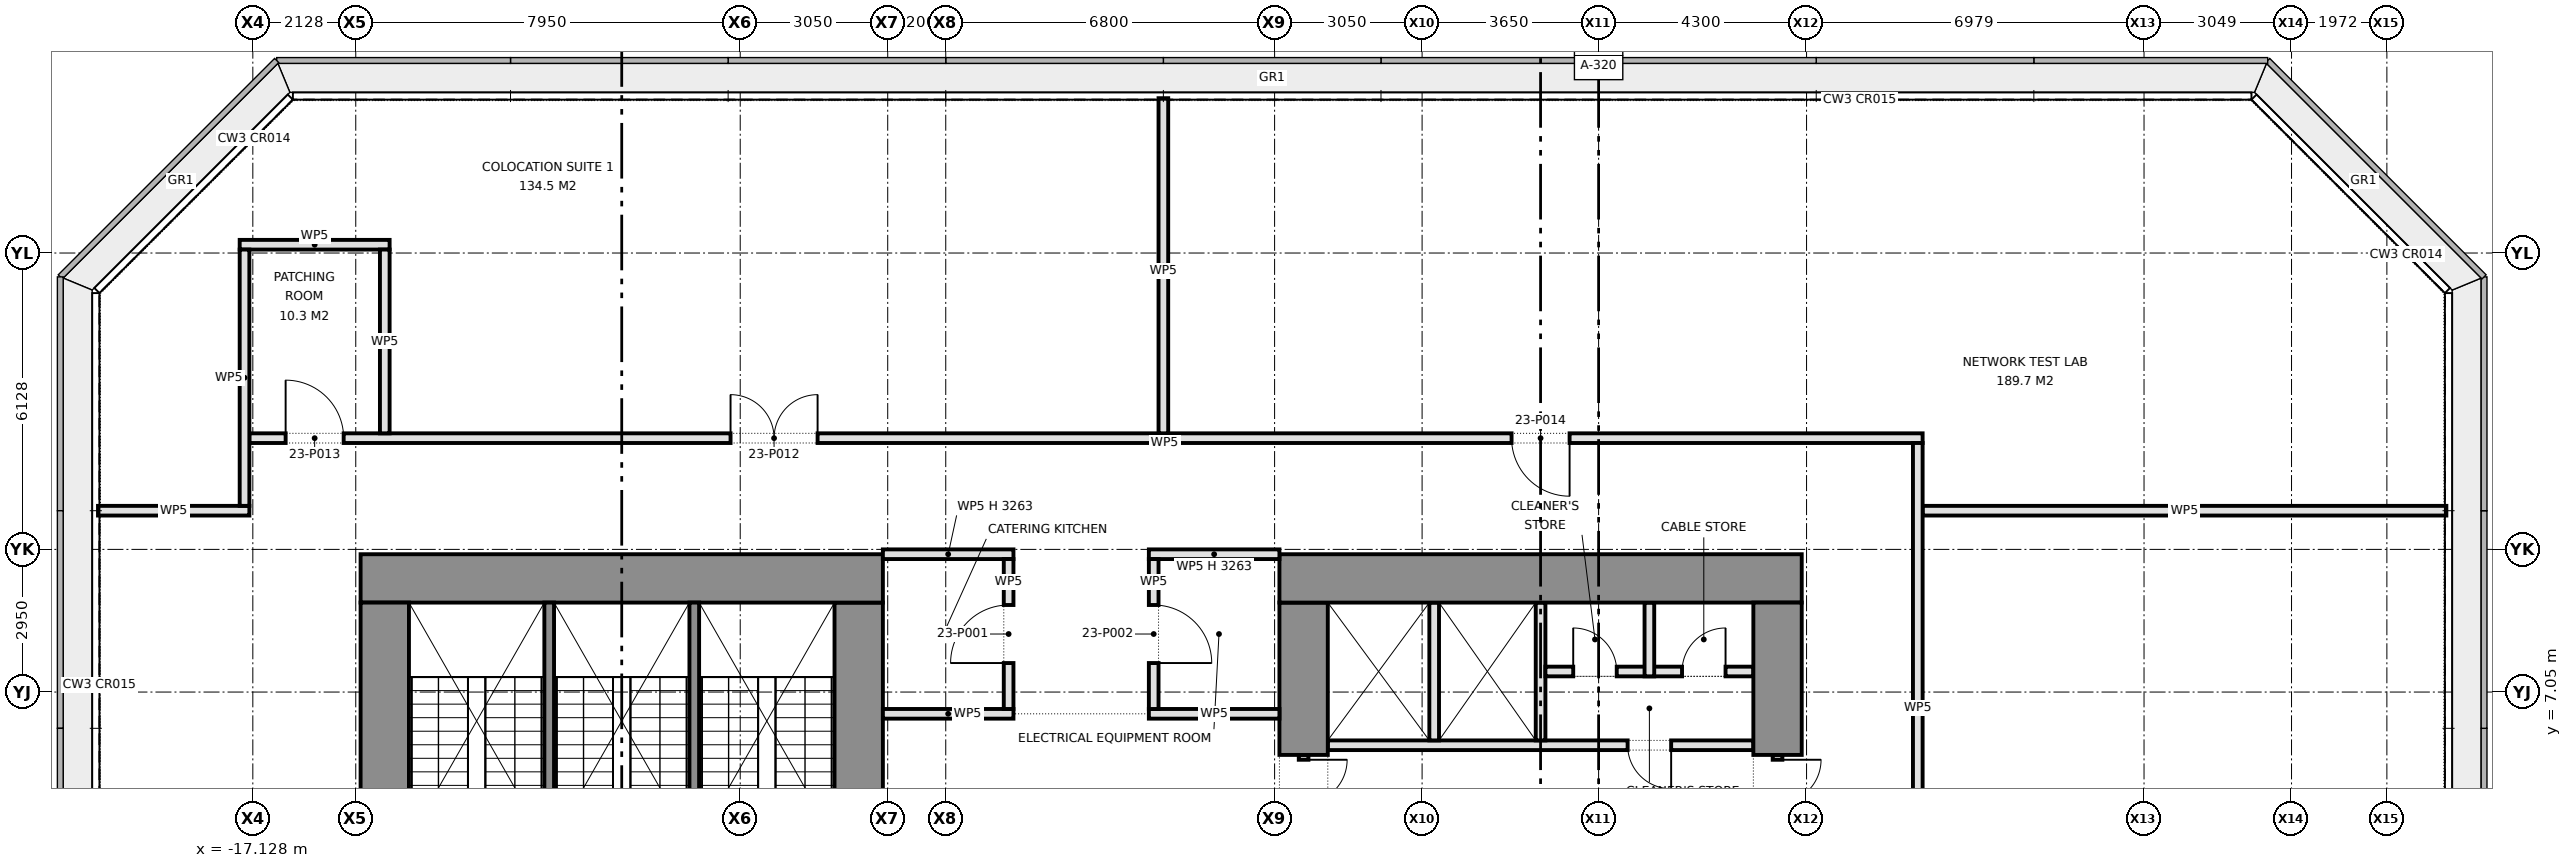
"""IFC4 building model, lengths in metres.
Left out: names, types, materials, properties, quantities, classifications, styles, units other than length and angle.
Written with IfcOpenShell. Run it as: python <this file> out.ifc"""

import sys

from ifc_helpers import new_model, si_unit, direction, frame, frame_2d, origin, place, context, subcontext, project, spatial, rectangle, extrude, element, fill, save


model = new_model("IFC4")
c1 = context("Model", 3, precision=1e-05, world=origin(), true_north=direction((0.0, 1.0)))
c2 = subcontext(c1, "Body", "Model", "MODEL_VIEW")
j1 = project(units=[si_unit("LENGTHUNIT", "METRE"), si_unit("PLANEANGLEUNIT", "RADIAN")], contexts=[c1])
p1 = place(None, origin())
s1 = spatial("IfcSite", under=j1, at=p1, CompositionType="ELEMENT")
p2 = place(p1, origin())
s2 = spatial("IfcBuilding", under=s1, at=p2, CompositionType="ELEMENT")
p3 = place(p2, frame((0.0, 0.0, 104.0)))
s3 = spatial("IfcBuildingStorey", under=s2, at=p3, CompositionType="ELEMENT", Elevation=104.0)
p4 = place(p3, frame((-14.9, 9.4, 0.0), z_axis=(0.0, 0.0, 1.0), x_axis=(1.0, 0.0, 0.0)))
e1 = element("IfcWall", 1, at=p4, inside=s3, PredefinedType="SHEAR", context=c2, shape_type="SweptSolid", body=[
    extrude(rectangle(XDim=10.8, YDim=1.0, at=frame_2d((5.4, 0.0))), origin(), (0.0, 0.0, 1.0), 4.2),
])
p5 = place(p3, frame((-14.4, 3.68, 0.0), z_axis=(0.0, 0.0, 1.0), x_axis=(0.0, 1.0, 0.0)))
e2 = element("IfcWall", 2, at=p5, inside=s3, PredefinedType="SHEAR", context=c2, shape_type="SweptSolid", body=[
    extrude(rectangle(XDim=5.22, YDim=1.0, at=frame_2d((2.61, 0.0))), origin(), (0.0, 0.0, 1.0), 4.2),
])
p6 = place(p3, frame((-4.6, 1.55, 0.0), z_axis=(0.0, 0.0, 1.0), x_axis=(0.0, 1.0, 0.0)))
e3 = element("IfcWall", 3, at=p6, inside=s3, PredefinedType="SHEAR", context=c2, shape_type="SweptSolid", body=[
    extrude(rectangle(XDim=7.35, YDim=1.0, at=frame_2d((3.675, 0.0))), origin(), (0.0, 0.0, 1.0), 4.2),
])
for number, where, z_axis, x_axis in (
    (4, (-11.0, 2.38, 0.0), (0.0, 0.0, 1.0), (0.0, 1.0, 0.0)),
    (5, (-8.0, 2.38, 0.0), (0.0, 0.0, 1.0), (0.0, 1.0, 0.0)),
):
    element("IfcWall", number, at=place(p3, frame(where, z_axis=z_axis, x_axis=x_axis)), inside=s3, PredefinedType="SHEAR", context=c2, shape_type="SweptSolid", body=[
        extrude(rectangle(XDim=6.52, YDim=0.2, at=frame_2d((3.26, 0.0))), origin(), (0.0, 0.0, 1.0), 4.2),
    ])
p7 = place(p3, frame((14.9, 9.4, 0.0), z_axis=(0.0, 0.0, 1.0), x_axis=(-1.0, 0.0, 0.0)))
e6 = element("IfcWall", 6, at=p7, inside=s3, PredefinedType="SHEAR", context=c2, shape_type="SweptSolid", body=[
    extrude(rectangle(XDim=10.8, YDim=1.0, at=frame_2d((5.4, 0.0))), origin(), (0.0, 0.0, 1.0), 4.2),
])
p8 = place(p3, frame((14.4, 8.9, 0.0), z_axis=(0.0, 0.0, 1.0), x_axis=(0.0, -1.0, 0.0)))
e7 = element("IfcWall", 7, at=p8, inside=s3, PredefinedType="SHEAR", context=c2, shape_type="SweptSolid", body=[
    extrude(rectangle(XDim=3.15, YDim=1.0, at=frame_2d((1.575, 0.0))), origin(), (0.0, 0.0, 1.0), 4.2),
])
p9 = place(p3, frame((14.4, 5.75, 0.0), z_axis=(0.0, 0.0, 1.0), x_axis=(0.0, -1.0, 0.0)))
e8 = element("IfcWall", 8, at=p9, inside=s3, PredefinedType="PARTITIONING", context=c2, shape_type="SweptSolid", body=[
    extrude(rectangle(XDim=2.0, YDim=0.2, at=frame_2d((1.0, 0.0))), origin(), (0.0, 0.0, 1.0), 2.4),
])
p10 = place(p9, frame((0.1, 0.0, 0.0)))
e9 = element("IfcOpeningElement", 9, at=p10, cuts=e8, PredefinedType="OPENING", context=c2, shape_type="SweptSolid", body=[
    extrude(rectangle(XDim=1.8, YDim=2.1, at=frame_2d((0.9, 1.05))), frame((0.0, 0.11, 0.0), z_axis=(0.0, -1.0, 0.0), x_axis=(1.0, 0.0, 0.0)), (0.0, 0.0, 1.0), 0.22),
])
p11 = place(p3, frame((4.6, 8.9, 0.0), z_axis=(0.0, 0.0, 1.0), x_axis=(0.0, -1.0, 0.0)))
e10 = element("IfcWall", 10, at=p11, inside=s3, PredefinedType="SHEAR", context=c2, shape_type="SweptSolid", body=[
    extrude(rectangle(XDim=3.15, YDim=1.0, at=frame_2d((1.575, 0.0))), origin(), (0.0, 0.0, 1.0), 4.2),
])
p12 = place(p3, frame((4.6, 5.75, 0.0), z_axis=(0.0, 0.0, 1.0), x_axis=(0.0, -1.0, 0.0)))
e11 = element("IfcWall", 11, at=p12, inside=s3, PredefinedType="PARTITIONING", context=c2, shape_type="SweptSolid", body=[
    extrude(rectangle(XDim=2.0, YDim=0.2, at=frame_2d((1.0, 0.0))), origin(), (0.0, 0.0, 1.0), 2.4),
])
p13 = place(p12, frame((0.1, 0.0, 0.0)))
e12 = element("IfcOpeningElement", 12, at=p13, cuts=e11, PredefinedType="OPENING", context=c2, shape_type="SweptSolid", body=[
    extrude(rectangle(XDim=1.8, YDim=2.1, at=frame_2d((0.9, 1.05))), frame((0.0, 0.11, 0.0), z_axis=(0.0, -1.0, 0.0), x_axis=(1.0, 0.0, 0.0)), (0.0, 0.0, 1.0), 0.22),
])
p14 = place(p3, frame((13.9, 5.95, 0.0), z_axis=(0.0, 0.0, 1.0), x_axis=(-1.0, 0.0, 0.0)))
e13 = element("IfcWall", 13, at=p14, inside=s3, PredefinedType="PARTITIONING", context=c2, shape_type="SweptSolid", body=[
    extrude(rectangle(XDim=8.8, YDim=0.2, at=frame_2d((4.4, 0.0))), origin(), (0.0, 0.0, 1.0), 4.2),
])
p15 = place(p14, frame((1.7, 0.0, 0.0)))
e14 = element("IfcOpeningElement", 14, at=p15, cuts=e13, PredefinedType="OPENING", context=c2, shape_type="SweptSolid", body=[
    extrude(rectangle(XDim=0.9, YDim=2.1, at=frame_2d((0.45, 1.05))), frame((0.0, 0.11, 0.0), z_axis=(0.0, -1.0, 0.0), x_axis=(1.0, 0.0, 0.0)), (0.0, 0.0, 1.0), 0.22),
])
for number, where, z_axis, x_axis in (
    (15, (9.5, 8.9, 0.0), (0.0, 0.0, 1.0), (0.0, -1.0, 0.0)),
    (16, (7.3, 8.9, 0.0), (0.0, 0.0, 1.0), (0.0, -1.0, 0.0)),
):
    element("IfcWall", number, at=place(p3, frame(where, z_axis=z_axis, x_axis=x_axis)), inside=s3, PredefinedType="PARTITIONING", context=c2, shape_type="SweptSolid", body=[
        extrude(rectangle(XDim=2.85, YDim=0.2, at=frame_2d((1.425, 0.0))), origin(), (0.0, 0.0, 1.0), 4.2),
    ])
p16 = place(p3, frame((13.9, 7.475, 0.0), z_axis=(0.0, 0.0, 1.0), x_axis=(-1.0, 0.0, 0.0)))
e17 = element("IfcWall", 17, at=p16, inside=s3, PredefinedType="PARTITIONING", context=c2, shape_type="SweptSolid", body=[
    extrude(rectangle(XDim=4.3, YDim=0.2, at=frame_2d((2.15, 0.0))), origin(), (0.0, 0.0, 1.0), 4.2),
])
p17 = place(p16, frame((0.575, 0.0, 0.0)))
e18 = element("IfcOpeningElement", 18, at=p17, cuts=e17, PredefinedType="OPENING", context=c2, shape_type="SweptSolid", body=[
    extrude(rectangle(XDim=0.9, YDim=2.1, at=frame_2d((0.45, 1.05))), frame((0.0, 0.11, 0.0), z_axis=(0.0, -1.0, 0.0), x_axis=(1.0, 0.0, 0.0)), (0.0, 0.0, 1.0), 0.22),
])
p18 = place(p16, frame((2.825, 0.0, 0.0)))
e19 = element("IfcOpeningElement", 19, at=p18, cuts=e17, PredefinedType="OPENING", context=c2, shape_type="SweptSolid", body=[
    extrude(rectangle(XDim=0.9, YDim=2.1, at=frame_2d((0.45, 1.05))), frame((0.0, 0.11, 0.0), z_axis=(0.0, -1.0, 0.0), x_axis=(1.0, 0.0, 0.0)), (0.0, 0.0, 1.0), 0.22),
])
p19 = place(p3, frame((11.75, 8.9, 0.0), z_axis=(0.0, 0.0, 1.0), x_axis=(0.0, -1.0, 0.0)))
e20 = element("IfcWall", 20, at=p19, inside=s3, PredefinedType="PARTITIONING", context=c2, shape_type="SweptSolid", body=[
    extrude(rectangle(XDim=1.525, YDim=0.2, at=frame_2d((0.762, 0.0))), origin(), (0.0, 0.0, 1.0), 4.2),
])
for number, where, z_axis, x_axis in (
    (21, (-4.1, 6.6, 0.0), (0.0, 0.0, 1.0), (1.0, 0.0, 0.0)),
    (22, (1.4, 6.6, 0.0), (0.0, 0.0, 1.0), (1.0, 0.0, 0.0)),
):
    element("IfcWall", number, at=place(p3, frame(where, z_axis=z_axis, x_axis=x_axis)), inside=s3, PredefinedType="PARTITIONING", context=c2, shape_type="SweptSolid", body=[
        extrude(rectangle(XDim=2.7, YDim=0.2, at=frame_2d((1.35, 0.0))), origin(), (0.0, 0.0, 1.0), 4.2),
    ])
for number, where, z_axis, x_axis in (
    (23, (-4.1, 9.9, 0.0), (0.0, 0.0, 1.0), (1.0, 0.0, 0.0)),
    (24, (1.4, 9.9, 0.0), (0.0, 0.0, 1.0), (1.0, 0.0, 0.0)),
):
    element("IfcWall", number, at=place(p3, frame(where, z_axis=z_axis, x_axis=x_axis)), inside=s3, PredefinedType="PARTITIONING", context=c2, shape_type="SweptSolid", body=[
        extrude(rectangle(XDim=2.7, YDim=0.2, at=frame_2d((1.35, 0.0))), origin(), (0.0, 0.0, 1.0), 3.263),
    ])
p20 = place(p3, frame((-20.33, 10.8, 0.0), z_axis=(0.0, 0.0, 1.0), x_axis=(1.0, 0.0, 0.0)))
e25 = element("IfcWall", 25, at=p20, inside=s3, PredefinedType="PARTITIONING", context=c2, shape_type="SweptSolid", body=[
    extrude(rectangle(XDim=3.13, YDim=0.2, at=frame_2d((1.565, 0.0))), origin(), (0.0, 0.0, 1.0), 4.2),
])
p21 = place(p3, frame((17.4, 10.8, 0.0), z_axis=(0.0, 0.0, 1.0), x_axis=(1.0, 0.0, 0.0)))
e26 = element("IfcWall", 26, at=p21, inside=s3, PredefinedType="PARTITIONING", context=c2, shape_type="SweptSolid", body=[
    extrude(rectangle(XDim=10.83, YDim=0.2, at=frame_2d((5.415, 0.0))), origin(), (0.0, 0.0, 1.0), 4.2),
])
p22 = place(p3, frame((-17.2, 12.3, 0.0), z_axis=(0.0, 0.0, 1.0), x_axis=(1.0, 0.0, 0.0)))
e27 = element("IfcWall", 27, at=p22, inside=s3, PredefinedType="PARTITIONING", context=c2, shape_type="SweptSolid", body=[
    extrude(rectangle(XDim=34.6, YDim=0.2, at=frame_2d((17.3, 0.0))), origin(), (0.0, 0.0, 1.0), 4.2),
])
p23 = place(p22, frame((9.95, 0.0, 0.0)))
e28 = element("IfcOpeningElement", 28, at=p23, cuts=e27, PredefinedType="OPENING", context=c2, shape_type="SweptSolid", body=[
    extrude(rectangle(XDim=1.8, YDim=2.1, at=frame_2d((0.9, 1.05))), frame((0.0, 0.11, 0.0), z_axis=(0.0, -1.0, 0.0), x_axis=(1.0, 0.0, 0.0)), (0.0, 0.0, 1.0), 0.22),
])
p24 = place(p22, frame((0.75, 0.0, 0.0)))
e29 = element("IfcOpeningElement", 29, at=p24, cuts=e27, PredefinedType="OPENING", context=c2, shape_type="SweptSolid", body=[
    extrude(rectangle(XDim=1.2, YDim=2.1, at=frame_2d((0.6, 1.05))), frame((0.0, 0.11, 0.0), z_axis=(0.0, -1.0, 0.0), x_axis=(1.0, 0.0, 0.0)), (0.0, 0.0, 1.0), 0.22),
])
p25 = place(p22, frame((26.1, 0.0, 0.0)))
e30 = element("IfcOpeningElement", 30, at=p25, cuts=e27, PredefinedType="OPENING", context=c2, shape_type="SweptSolid", body=[
    extrude(rectangle(XDim=1.2, YDim=2.1, at=frame_2d((0.6, 1.05))), frame((0.0, 0.11, 0.0), z_axis=(0.0, -1.0, 0.0), x_axis=(1.0, 0.0, 0.0)), (0.0, 0.0, 1.0), 0.22),
])
p26 = place(p3, frame((-17.4, 16.3, 0.0), z_axis=(0.0, 0.0, 1.0), x_axis=(1.0, 0.0, 0.0)))
e31 = element("IfcWall", 31, at=p26, inside=s3, PredefinedType="PARTITIONING", context=c2, shape_type="SweptSolid", body=[
    extrude(rectangle(XDim=3.1, YDim=0.2, at=frame_2d((1.55, 0.0))), origin(), (0.0, 0.0, 1.0), 4.2),
])
p27 = place(p3, frame((17.3, -12.2, 0.0), z_axis=(0.0, 0.0, 1.0), x_axis=(0.0, 1.0, 0.0)))
e32 = element("IfcWall", 32, at=p27, inside=s3, PredefinedType="PARTITIONING", context=c2, shape_type="SweptSolid", body=[
    extrude(rectangle(XDim=24.4, YDim=0.2, at=frame_2d((12.2, 0.0))), origin(), (0.0, 0.0, 1.0), 4.2),
])
p28 = place(p27, frame((11.85, 0.0, 0.0)))
e33 = element("IfcOpeningElement", 33, at=p28, cuts=e32, PredefinedType="OPENING", context=c2, shape_type="SweptSolid", body=[
    extrude(rectangle(XDim=1.8, YDim=2.1, at=frame_2d((0.9, 1.05))), frame((0.0, 0.11, 0.0), z_axis=(0.0, -1.0, 0.0), x_axis=(1.0, 0.0, 0.0)), (0.0, 0.0, 1.0), 0.22),
])
p29 = place(p27, frame((0.7, 0.0, 0.0)))
e34 = element("IfcOpeningElement", 34, at=p29, cuts=e32, PredefinedType="OPENING", context=c2, shape_type="SweptSolid", body=[
    extrude(rectangle(XDim=1.0, YDim=2.1, at=frame_2d((0.5, 1.05))), frame((0.0, 0.11, 0.0), z_axis=(0.0, -1.0, 0.0), x_axis=(1.0, 0.0, 0.0)), (0.0, 0.0, 1.0), 0.22),
])
p30 = place(p3, frame((1.7, 12.4, 0.0), z_axis=(0.0, 0.0, 1.0), x_axis=(0.0, 1.0, 0.0)))
e35 = element("IfcWall", 35, at=p30, inside=s3, PredefinedType="PARTITIONING", context=c2, shape_type="SweptSolid", body=[
    extrude(rectangle(XDim=6.93, YDim=0.2, at=frame_2d((3.465, 0.0))), origin(), (0.0, 0.0, 1.0), 4.2),
])
p31 = place(p3, frame((1.5, 6.7, 0.0), z_axis=(0.0, 0.0, 1.0), x_axis=(0.0, 1.0, 0.0)))
e36 = element("IfcWall", 36, at=p31, inside=s3, PredefinedType="PARTITIONING", context=c2, shape_type="SweptSolid", body=[
    extrude(rectangle(XDim=3.1, YDim=0.2, at=frame_2d((1.55, 0.0))), origin(), (0.0, 0.0, 1.0), 4.2),
])
p32 = place(p31, frame((0.95, 0.0, 0.0)))
e37 = element("IfcOpeningElement", 37, at=p32, cuts=e36, PredefinedType="OPENING", context=c2, shape_type="SweptSolid", body=[
    extrude(rectangle(XDim=1.2, YDim=2.1, at=frame_2d((0.6, 1.05))), frame((0.0, 0.11, 0.0), z_axis=(0.0, -1.0, 0.0), x_axis=(1.0, 0.0, 0.0)), (0.0, 0.0, 1.0), 0.22),
])
p33 = place(p3, frame((-1.5, 6.7, 0.0), z_axis=(0.0, 0.0, 1.0), x_axis=(0.0, 1.0, 0.0)))
e38 = element("IfcWall", 38, at=p33, inside=s3, PredefinedType="PARTITIONING", context=c2, shape_type="SweptSolid", body=[
    extrude(rectangle(XDim=3.1, YDim=0.2, at=frame_2d((1.55, 0.0))), origin(), (0.0, 0.0, 1.0), 4.2),
])
p34 = place(p33, frame((0.95, 0.0, 0.0)))
e39 = element("IfcOpeningElement", 39, at=p34, cuts=e38, PredefinedType="OPENING", context=c2, shape_type="SweptSolid", body=[
    extrude(rectangle(XDim=1.2, YDim=2.1, at=frame_2d((0.6, 1.05))), frame((0.0, 0.11, 0.0), z_axis=(0.0, -1.0, 0.0), x_axis=(1.0, 0.0, 0.0)), (0.0, 0.0, 1.0), 0.22),
])
p35 = place(p3, frame((-14.4, 12.4, 0.0), z_axis=(0.0, 0.0, 1.0), x_axis=(0.0, 1.0, 0.0)))
e40 = element("IfcWall", 40, at=p35, inside=s3, PredefinedType="PARTITIONING", context=c2, shape_type="SweptSolid", body=[
    extrude(rectangle(XDim=3.8, YDim=0.2, at=frame_2d((1.9, 0.0))), origin(), (0.0, 0.0, 1.0), 4.2),
])
p36 = place(p3, frame((-17.3, 10.9, 0.0), z_axis=(0.0, 0.0, 1.0), x_axis=(0.0, 1.0, 0.0)))
e41 = element("IfcWall", 41, at=p36, inside=s3, PredefinedType="PARTITIONING", context=c2, shape_type="SweptSolid", body=[
    extrude(rectangle(XDim=5.3, YDim=0.2, at=frame_2d((2.65, 0.0))), origin(), (0.0, 0.0, 1.0), 4.2),
])
p37 = place(p10, origin())
e42 = element("IfcDoor", 42, at=p37, inside=s3, OperationType="DOUBLE_DOOR_SINGLE_SWING", PredefinedType="DOOR", context=c2, shape_type="SweptSolid", body=[
    extrude(rectangle(XDim=1.8, YDim=2.1, at=frame_2d((0.9, 1.05))), frame((0.0, 0.025, 0.0), z_axis=(0.0, -1.0, 0.0), x_axis=(1.0, 0.0, 0.0)), (0.0, 0.0, 1.0), 0.05),
])
fill(e9, e42)
p38 = place(p13, origin())
e43 = element("IfcDoor", 43, at=p38, inside=s3, OperationType="DOUBLE_DOOR_SINGLE_SWING", PredefinedType="DOOR", context=c2, shape_type="SweptSolid", body=[
    extrude(rectangle(XDim=1.8, YDim=2.1, at=frame_2d((0.9, 1.05))), frame((0.0, 0.025, 0.0), z_axis=(0.0, -1.0, 0.0), x_axis=(1.0, 0.0, 0.0)), (0.0, 0.0, 1.0), 0.05),
])
fill(e12, e43)
p39 = place(p15, origin())
e44 = element("IfcDoor", 44, at=p39, inside=s3, OperationType="SINGLE_SWING_LEFT", PredefinedType="DOOR", context=c2, shape_type="SweptSolid", body=[
    extrude(rectangle(XDim=0.9, YDim=2.1, at=frame_2d((0.45, 1.05))), frame((0.0, 0.025, 0.0), z_axis=(0.0, -1.0, 0.0), x_axis=(1.0, 0.0, 0.0)), (0.0, 0.0, 1.0), 0.05),
])
fill(e14, e44)
p40 = place(p17, frame((0.9, 0.0, 0.0), z_axis=(0.0, 0.0, 1.0), x_axis=(-1.0, 0.0, 0.0)))
e45 = element("IfcDoor", 45, at=p40, inside=s3, OperationType="SINGLE_SWING_RIGHT", PredefinedType="DOOR", context=c2, shape_type="SweptSolid", body=[
    extrude(rectangle(XDim=0.9, YDim=2.1, at=frame_2d((0.45, 1.05))), frame((0.0, 0.025, 0.0), z_axis=(0.0, -1.0, 0.0), x_axis=(1.0, 0.0, 0.0)), (0.0, 0.0, 1.0), 0.05),
])
fill(e18, e45)
p41 = place(p18, frame((0.9, 0.0, 0.0), z_axis=(0.0, 0.0, 1.0), x_axis=(-1.0, 0.0, 0.0)))
e46 = element("IfcDoor", 46, at=p41, inside=s3, OperationType="SINGLE_SWING_LEFT", PredefinedType="DOOR", context=c2, shape_type="SweptSolid", body=[
    extrude(rectangle(XDim=0.9, YDim=2.1, at=frame_2d((0.45, 1.05))), frame((0.0, 0.025, 0.0), z_axis=(0.0, -1.0, 0.0), x_axis=(1.0, 0.0, 0.0)), (0.0, 0.0, 1.0), 0.05),
])
fill(e19, e46)
p42 = place(p34, origin())
e47 = element("IfcDoor", 47, at=p42, inside=s3, OperationType="SINGLE_SWING_LEFT", PredefinedType="DOOR", context=c2, shape_type="SweptSolid", body=[
    extrude(rectangle(XDim=1.2, YDim=2.1, at=frame_2d((0.6, 1.05))), frame((0.0, 0.025, 0.0), z_axis=(0.0, -1.0, 0.0), x_axis=(1.0, 0.0, 0.0)), (0.0, 0.0, 1.0), 0.05),
])
fill(e39, e47)
p43 = place(p32, frame((1.2, 0.0, 0.0), z_axis=(0.0, 0.0, 1.0), x_axis=(-1.0, 0.0, 0.0)))
e48 = element("IfcDoor", 48, at=p43, inside=s3, OperationType="SINGLE_SWING_RIGHT", PredefinedType="DOOR", context=c2, shape_type="SweptSolid", body=[
    extrude(rectangle(XDim=1.2, YDim=2.1, at=frame_2d((0.6, 1.05))), frame((0.0, 0.025, 0.0), z_axis=(0.0, -1.0, 0.0), x_axis=(1.0, 0.0, 0.0)), (0.0, 0.0, 1.0), 0.05),
])
fill(e37, e48)
p44 = place(p23, origin())
e49 = element("IfcDoor", 49, at=p44, inside=s3, OperationType="DOUBLE_DOOR_SINGLE_SWING", PredefinedType="DOOR", context=c2, shape_type="SweptSolid", body=[
    extrude(rectangle(XDim=1.8, YDim=2.1, at=frame_2d((0.9, 1.05))), frame((0.0, 0.025, 0.0), z_axis=(0.0, -1.0, 0.0), x_axis=(1.0, 0.0, 0.0)), (0.0, 0.0, 1.0), 0.05),
])
fill(e28, e49)
p45 = place(p24, origin())
e50 = element("IfcDoor", 50, at=p45, inside=s3, OperationType="SINGLE_SWING_LEFT", PredefinedType="DOOR", context=c2, shape_type="SweptSolid", body=[
    extrude(rectangle(XDim=1.2, YDim=2.1, at=frame_2d((0.6, 1.05))), frame((0.0, 0.025, 0.0), z_axis=(0.0, -1.0, 0.0), x_axis=(1.0, 0.0, 0.0)), (0.0, 0.0, 1.0), 0.05),
])
fill(e29, e50)
p46 = place(p25, frame((1.2, 0.0, 0.0), z_axis=(0.0, 0.0, 1.0), x_axis=(-1.0, 0.0, 0.0)))
e51 = element("IfcDoor", 51, at=p46, inside=s3, OperationType="SINGLE_SWING_LEFT", PredefinedType="DOOR", context=c2, shape_type="SweptSolid", body=[
    extrude(rectangle(XDim=1.2, YDim=2.1, at=frame_2d((0.6, 1.05))), frame((0.0, 0.025, 0.0), z_axis=(0.0, -1.0, 0.0), x_axis=(1.0, 0.0, 0.0)), (0.0, 0.0, 1.0), 0.05),
])
fill(e30, e51)
save(model, sys.argv[1])
